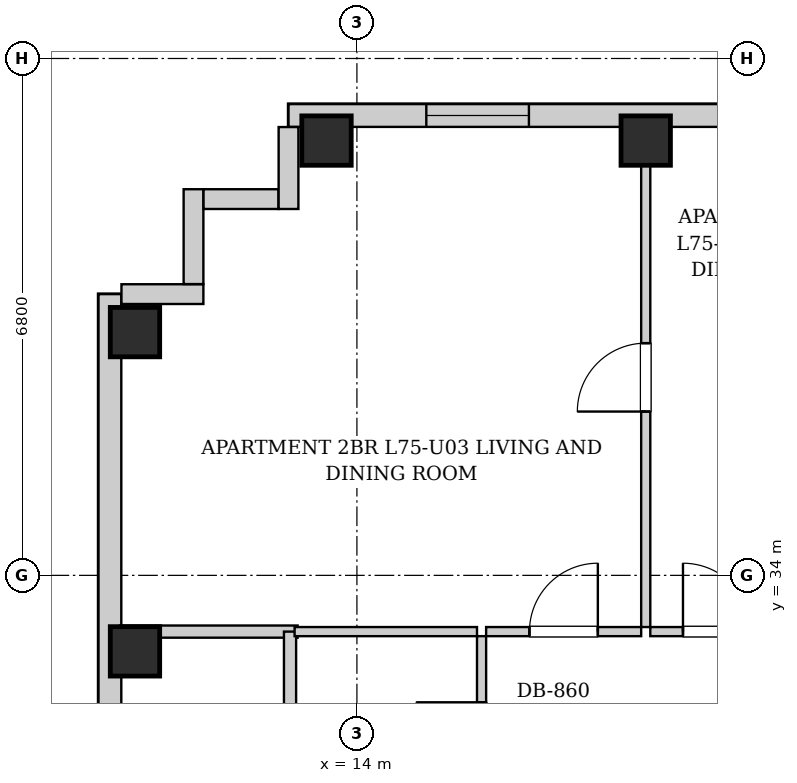
"""IFC4 building model, lengths in metres.
Left out: names, types, materials, properties, quantities, classifications, styles, units other than length and angle.
Written with IfcOpenShell. Run it as: python <this file> out.ifc"""

import sys

from ifc_helpers import new_model, si_unit, direction, frame, frame_2d, origin, origin_2d, place, context, subcontext, project, spatial, rectangle, extrude, element, fill, save


model = new_model("IFC4")
c1 = context("Model", 3, precision=1e-05, world=origin(), true_north=direction((0.0, 1.0)))
c2 = subcontext(c1, "Body", "Model", "MODEL_VIEW")
j1 = project(units=[si_unit("LENGTHUNIT", "METRE"), si_unit("PLANEANGLEUNIT", "RADIAN")], contexts=[c1])
p1 = place(None, origin())
s1 = spatial("IfcSite", under=j1, at=p1, CompositionType="ELEMENT")
p2 = place(p1, origin())
s2 = spatial("IfcBuilding", under=s1, at=p2, CompositionType="ELEMENT")
p3 = place(p2, frame((0.0, 0.0, 258.1)))
s3 = spatial("IfcBuildingStorey", under=s2, at=p3, CompositionType="ELEMENT", Elevation=258.1)
for number, where, z_axis, x_axis in (
    (1, (13.6, 39.72, 0.0), (0.0, 0.0, 1.0), (1.0, 0.0, 0.0)),
    (2, (17.8, 39.72, 0.0), (0.0, 0.0, 1.0), (1.0, 0.0, 0.0)),
    (3, (11.08, 33.0, 0.0), (0.0, 0.0, 1.0), (1.0, 0.0, 0.0)),
    (4, (11.08, 37.2, 0.0), (0.0, 0.0, 1.0), (1.0, 0.0, 0.0)),
):
    element("IfcColumn", number, at=place(p3, frame(where, z_axis=z_axis, x_axis=x_axis)), inside=s3, PredefinedType="COLUMN", context=c2, shape_type="SweptSolid", body=[
        extrude(rectangle(XDim=0.65, YDim=0.65, at=origin_2d()), origin(), (0.0, 0.0, 1.0), 3.4),
    ])
p4 = place(p3, frame((13.1, 40.05, 0.0), z_axis=(0.0, 0.0, 1.0), x_axis=(1.0, 0.0, 0.0)))
e5 = element("IfcWall", 5, at=p4, inside=s3, PredefinedType="SOLIDWALL", context=c2, shape_type="SweptSolid", body=[
    extrude(rectangle(XDim=18.25, YDim=0.3, at=frame_2d((9.125, 0.0))), origin(), (0.0, 0.0, 1.0), 3.05),
])
p5 = place(p4, frame((1.813, 0.0, 0.55)))
e6 = element("IfcOpeningElement", 6, at=p5, cuts=e5, PredefinedType="OPENING", context=c2, shape_type="SweptSolid", body=[
    extrude(rectangle(XDim=1.35, YDim=1.2, at=frame_2d((0.675, 0.6))), frame((0.0, 0.16, 0.0), z_axis=(0.0, -1.0, 0.0), x_axis=(1.0, 0.0, 0.0)), (0.0, 0.0, 1.0), 0.32),
])
p6 = place(p4, frame((5.66, 0.0, 0.55)))
e7 = element("IfcOpeningElement", 7, at=p6, cuts=e5, PredefinedType="OPENING", context=c2, shape_type="SweptSolid", body=[
    extrude(rectangle(XDim=1.35, YDim=1.2, at=frame_2d((0.675, 0.6))), frame((0.0, 0.16, 0.0), z_axis=(0.0, -1.0, 0.0), x_axis=(1.0, 0.0, 0.0)), (0.0, 0.0, 1.0), 0.32),
])
p7 = place(p4, frame((8.55, 0.0, 0.55)))
e8 = element("IfcOpeningElement", 8, at=p7, cuts=e5, PredefinedType="OPENING", context=c2, shape_type="SweptSolid", body=[
    extrude(rectangle(XDim=0.85, YDim=1.2, at=frame_2d((0.425, 0.6))), frame((0.0, 0.16, 0.0), z_axis=(0.0, -1.0, 0.0), x_axis=(1.0, 0.0, 0.0)), (0.0, 0.0, 1.0), 0.32),
])
p8 = place(p4, frame((14.4, 0.0, 0.55)))
e9 = element("IfcOpeningElement", 9, at=p8, cuts=e5, PredefinedType="OPENING", context=c2, shape_type="SweptSolid", body=[
    extrude(rectangle(XDim=1.35, YDim=1.2, at=frame_2d((0.675, 0.6))), frame((0.0, 0.16, 0.0), z_axis=(0.0, -1.0, 0.0), x_axis=(1.0, 0.0, 0.0)), (0.0, 0.0, 1.0), 0.32),
])
p9 = place(p3, frame((10.75, 6.3, 0.0), z_axis=(0.0, 0.0, 1.0), x_axis=(0.0, 1.0, 0.0)))
e10 = element("IfcWall", 10, at=p9, inside=s3, PredefinedType="SOLIDWALL", context=c2, shape_type="SweptSolid", body=[
    extrude(rectangle(XDim=31.4, YDim=0.3, at=frame_2d((15.7, 0.0))), origin(), (0.0, 0.0, 1.0), 3.05),
])
p10 = place(p9, frame((1.653, 0.0, 0.55)))
e11 = element("IfcOpeningElement", 11, at=p10, cuts=e10, PredefinedType="OPENING", context=c2, shape_type="SweptSolid", body=[
    extrude(rectangle(XDim=1.35, YDim=1.2, at=frame_2d((0.675, 0.6))), frame((0.0, 0.16, 0.0), z_axis=(0.0, -1.0, 0.0), x_axis=(1.0, 0.0, 0.0)), (0.0, 0.0, 1.0), 0.32),
])
p11 = place(p9, frame((10.367, 0.0, 0.55)))
e12 = element("IfcOpeningElement", 12, at=p11, cuts=e10, PredefinedType="OPENING", context=c2, shape_type="SweptSolid", body=[
    extrude(rectangle(XDim=1.35, YDim=1.2, at=frame_2d((0.675, 0.6))), frame((0.0, 0.16, 0.0), z_axis=(0.0, -1.0, 0.0), x_axis=(1.0, 0.0, 0.0)), (0.0, 0.0, 1.0), 0.32),
])
p12 = place(p9, frame((19.683, 0.0, 0.55)))
e13 = element("IfcOpeningElement", 13, at=p12, cuts=e10, PredefinedType="OPENING", context=c2, shape_type="SweptSolid", body=[
    extrude(rectangle(XDim=1.35, YDim=1.2, at=frame_2d((0.675, 0.6))), frame((0.0, 0.16, 0.0), z_axis=(0.0, -1.0, 0.0), x_axis=(1.0, 0.0, 0.0)), (0.0, 0.0, 1.0), 0.32),
])
p13 = place(p3, frame((10.902, 37.7, 0.0), z_axis=(0.0, 0.0, 1.0), x_axis=(1.0, 0.0, 0.0)))
e14 = element("IfcWall", 14, at=p13, inside=s3, PredefinedType="SOLIDWALL", context=c2, shape_type="SweptSolid", body=[
    extrude(rectangle(XDim=1.078, YDim=0.26, at=frame_2d((0.539, 0.0))), origin(), (0.0, 0.0, 1.0), 3.05),
])
p14 = place(p3, frame((11.85, 37.832, 0.0), z_axis=(0.0, 0.0, 1.0), x_axis=(0.0, 1.0, 0.0)))
e15 = element("IfcWall", 15, at=p14, inside=s3, PredefinedType="SOLIDWALL", context=c2, shape_type="SweptSolid", body=[
    extrude(rectangle(XDim=1.248, YDim=0.26, at=frame_2d((0.624, 0.0))), origin(), (0.0, 0.0, 1.0), 3.05),
])
p15 = place(p3, frame((11.982, 38.95, 0.0), z_axis=(0.0, 0.0, 1.0), x_axis=(1.0, 0.0, 0.0)))
e16 = element("IfcWall", 16, at=p15, inside=s3, PredefinedType="SOLIDWALL", context=c2, shape_type="SweptSolid", body=[
    extrude(rectangle(XDim=0.986, YDim=0.26, at=frame_2d((0.493, 0.0))), origin(), (0.0, 0.0, 1.0), 3.05),
])
p16 = place(p3, frame((13.1, 38.82, 0.0), z_axis=(0.0, 0.0, 1.0), x_axis=(0.0, 1.0, 0.0)))
e17 = element("IfcWall", 17, at=p16, inside=s3, PredefinedType="SOLIDWALL", context=c2, shape_type="SweptSolid", body=[
    extrude(rectangle(XDim=1.078, YDim=0.26, at=frame_2d((0.539, 0.0))), origin(), (0.0, 0.0, 1.0), 3.05),
])
p17 = place(p3, frame((10.88, 33.26, 0.0), z_axis=(0.0, 0.0, 1.0), x_axis=(1.0, 0.0, 0.0)))
e18 = element("IfcWall", 18, at=p17, inside=s3, PredefinedType="PARTITIONING", context=c2, shape_type="SweptSolid", body=[
    extrude(rectangle(XDim=2.34, YDim=0.16, at=frame_2d((1.17, 0.0))), origin(), (0.0, 0.0, 1.0), 3.05),
])
p18 = place(p3, frame((13.12, 30.6, 0.0), z_axis=(0.0, 0.0, 1.0), x_axis=(0.0, 1.0, 0.0)))
e19 = element("IfcWall", 19, at=p18, inside=s3, PredefinedType="PARTITIONING", context=c2, shape_type="SweptSolid", body=[
    extrude(rectangle(XDim=2.66, YDim=0.16, at=frame_2d((1.33, 0.0))), origin(), (0.0, 0.0, 1.0), 3.05),
])
p19 = place(p3, frame((15.64, 30.6, 0.0), z_axis=(0.0, 0.0, 1.0), x_axis=(0.0, 1.0, 0.0)))
e20 = element("IfcWall", 20, at=p19, inside=s3, PredefinedType="PARTITIONING", context=c2, shape_type="SweptSolid", body=[
    extrude(rectangle(XDim=2.6, YDim=0.12, at=frame_2d((1.3, 0.0))), origin(), (0.0, 0.0, 1.0), 3.05),
])
p20 = place(p19, frame((0.87, 0.0, 0.0)))
e21 = element("IfcOpeningElement", 21, at=p20, cuts=e20, PredefinedType="OPENING", context=c2, shape_type="SweptSolid", body=[
    extrude(rectangle(XDim=0.86, YDim=2.05, at=frame_2d((0.43, 1.025))), frame((0.0, 0.07, 0.0), z_axis=(0.0, -1.0, 0.0), x_axis=(1.0, 0.0, 0.0)), (0.0, 0.0, 1.0), 0.14),
])
p21 = place(p3, frame((13.18, 33.26, 0.0), z_axis=(0.0, 0.0, 1.0), x_axis=(1.0, 0.0, 0.0)))
e22 = element("IfcWall", 22, at=p21, inside=s3, PredefinedType="PARTITIONING", context=c2, shape_type="SweptSolid", body=[
    extrude(rectangle(XDim=2.4, YDim=0.12, at=frame_2d((1.2, 0.0))), origin(), (0.0, 0.0, 1.0), 3.05),
])
p22 = place(p3, frame((15.7, 33.26, 0.0), z_axis=(0.0, 0.0, 1.0), x_axis=(1.0, 0.0, 0.0)))
e23 = element("IfcWall", 23, at=p22, inside=s3, PredefinedType="PARTITIONING", context=c2, shape_type="SweptSolid", body=[
    extrude(rectangle(XDim=2.04, YDim=0.12, at=frame_2d((1.02, 0.0))), origin(), (0.0, 0.0, 1.0), 3.05),
])
p23 = place(p22, frame((0.57, 0.0, 0.0)))
e24 = element("IfcOpeningElement", 24, at=p23, cuts=e23, PredefinedType="OPENING", context=c2, shape_type="SweptSolid", body=[
    extrude(rectangle(XDim=0.9, YDim=2.05, at=frame_2d((0.45, 1.025))), frame((0.0, 0.07, 0.0), z_axis=(0.0, -1.0, 0.0), x_axis=(1.0, 0.0, 0.0)), (0.0, 0.0, 1.0), 0.14),
])
p24 = place(p3, frame((17.86, 33.26, 0.0), z_axis=(0.0, 0.0, 1.0), x_axis=(1.0, 0.0, 0.0)))
e25 = element("IfcWall", 25, at=p24, inside=s3, PredefinedType="PARTITIONING", context=c2, shape_type="SweptSolid", body=[
    extrude(rectangle(XDim=1.76, YDim=0.12, at=frame_2d((0.88, 0.0))), origin(), (0.0, 0.0, 1.0), 3.05),
])
p25 = place(p24, frame((0.43, 0.0, 0.0)))
e26 = element("IfcOpeningElement", 26, at=p25, cuts=e25, PredefinedType="OPENING", context=c2, shape_type="SweptSolid", body=[
    extrude(rectangle(XDim=0.9, YDim=2.05, at=frame_2d((0.45, 1.025))), frame((0.0, 0.07, 0.0), z_axis=(0.0, -1.0, 0.0), x_axis=(1.0, 0.0, 0.0)), (0.0, 0.0, 1.0), 0.14),
])
p26 = place(p3, frame((17.8, 33.32, 0.0), z_axis=(0.0, 0.0, 1.0), x_axis=(0.0, 1.0, 0.0)))
e27 = element("IfcWall", 27, at=p26, inside=s3, PredefinedType="PARTITIONING", context=c2, shape_type="SweptSolid", body=[
    extrude(rectangle(XDim=6.6, YDim=0.12, at=frame_2d((3.3, 0.0))), origin(), (0.0, 0.0, 1.0), 2.578),
])
p27 = place(p26, frame((2.835, 0.0, 0.0)))
e28 = element("IfcOpeningElement", 28, at=p27, cuts=e27, PredefinedType="OPENING", context=c2, shape_type="SweptSolid", body=[
    extrude(rectangle(XDim=0.9, YDim=2.05, at=frame_2d((0.45, 1.025))), frame((0.0, 0.07, 0.0), z_axis=(0.0, -1.0, 0.0), x_axis=(1.0, 0.0, 0.0)), (0.0, 0.0, 1.0), 0.14),
])
p28 = place(p20, origin())
e29 = element("IfcDoor", 29, at=p28, inside=s3, OperationType="SINGLE_SWING_RIGHT", PredefinedType="DOOR", context=c2, shape_type="SweptSolid", body=[
    extrude(rectangle(XDim=0.86, YDim=2.05, at=frame_2d((0.43, 1.025))), frame((0.0, 0.025, 0.0), z_axis=(0.0, -1.0, 0.0), x_axis=(1.0, 0.0, 0.0)), (0.0, 0.0, 1.0), 0.05),
])
fill(e21, e29)
p29 = place(p23, origin())
e30 = element("IfcDoor", 30, at=p29, inside=s3, OperationType="SINGLE_SWING_RIGHT", PredefinedType="DOOR", context=c2, shape_type="SweptSolid", body=[
    extrude(rectangle(XDim=0.9, YDim=2.05, at=frame_2d((0.45, 1.025))), frame((0.0, 0.025, 0.0), z_axis=(0.0, -1.0, 0.0), x_axis=(1.0, 0.0, 0.0)), (0.0, 0.0, 1.0), 0.05),
])
fill(e24, e30)
p30 = place(p25, origin())
e31 = element("IfcDoor", 31, at=p30, inside=s3, OperationType="SINGLE_SWING_LEFT", PredefinedType="DOOR", context=c2, shape_type="SweptSolid", body=[
    extrude(rectangle(XDim=0.9, YDim=2.05, at=frame_2d((0.45, 1.025))), frame((0.0, 0.025, 0.0), z_axis=(0.0, -1.0, 0.0), x_axis=(1.0, 0.0, 0.0)), (0.0, 0.0, 1.0), 0.05),
])
fill(e26, e31)
p31 = place(p27, origin())
e32 = element("IfcDoor", 32, at=p31, inside=s3, OperationType="SINGLE_SWING_LEFT", PredefinedType="DOOR", context=c2, shape_type="SweptSolid", body=[
    extrude(rectangle(XDim=0.9, YDim=2.05, at=frame_2d((0.45, 1.025))), frame((0.0, 0.025, 0.0), z_axis=(0.0, -1.0, 0.0), x_axis=(1.0, 0.0, 0.0)), (0.0, 0.0, 1.0), 0.05),
])
fill(e28, e32)
p32 = place(p5, origin())
e33 = element("IfcWindow", 33, at=p32, inside=s3, PartitioningType="SINGLE_PANEL", PredefinedType="WINDOW", context=c2, shape_type="SweptSolid", body=[
    extrude(rectangle(XDim=1.35, YDim=1.2, at=frame_2d((0.675, 0.6))), frame((0.0, 0.03, 0.0), z_axis=(0.0, -1.0, 0.0), x_axis=(1.0, 0.0, 0.0)), (0.0, 0.0, 1.0), 0.06),
])
fill(e6, e33)
save(model, sys.argv[1])
